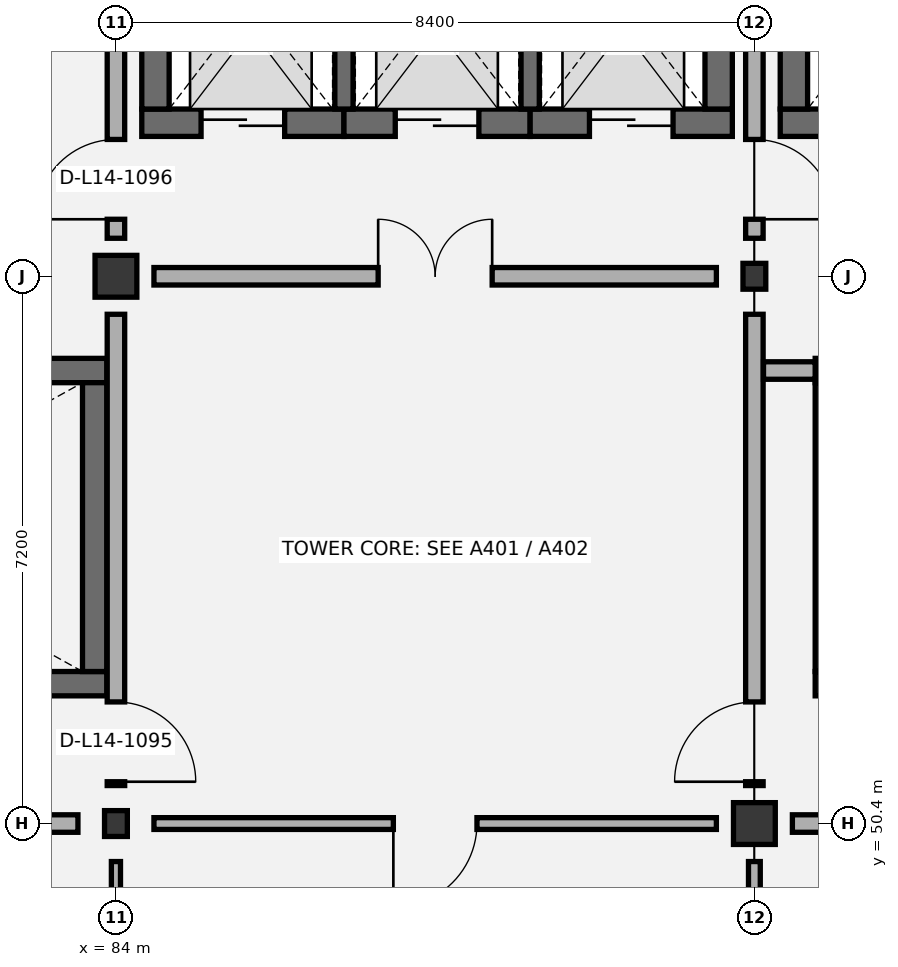
"""IFC4 building model, lengths in metres.
Left out: names, types, materials, properties, quantities, classifications, styles, units other than length and angle.
Written with IfcOpenShell. Run it as: python <this file> out.ifc"""

import sys

from ifc_helpers import new_model, si_unit, direction, frame, frame_2d, origin, origin_2d, place, context, subcontext, project, spatial, rectangle, i_section, extrude, element, fill, save


model = new_model("IFC4")
c1 = context("Model", 3, precision=1e-05, world=origin(), true_north=direction((0.0, 1.0)))
c2 = subcontext(c1, "Body", "Model", "MODEL_VIEW")
j1 = project(units=[si_unit("LENGTHUNIT", "METRE"), si_unit("PLANEANGLEUNIT", "RADIAN")], contexts=[c1])
p1 = place(None, origin())
s1 = spatial("IfcSite", under=j1, at=p1, CompositionType="ELEMENT")
p2 = place(p1, origin())
s2 = spatial("IfcBuilding", under=s1, at=p2, CompositionType="ELEMENT")
p3 = place(p2, frame((0.0, 0.0, 64.8)))
s3 = spatial("IfcBuildingStorey", under=s2, at=p3, CompositionType="ELEMENT", Elevation=64.8)
p4 = place(p3, frame((84.0, 50.4, 0.0), z_axis=(0.0, 0.0, 1.0), x_axis=(1.0, 0.0, 0.0)))
e1 = element("IfcColumn", 1, at=p4, inside=s3, PredefinedType="COLUMN", context=c2, shape_type="SweptSolid", body=[
    extrude(i_section(OverallWidth=0.3, OverallDepth=0.34, WebThickness=0.012, FlangeThickness=0.021, FilletRadius=0.027, at=origin_2d()), origin(), (0.0, 0.0, 1.0), 4.2),
])
for number, where, z_axis, x_axis in (
    (2, (84.0, 57.6, 0.0), (0.0, 0.0, 1.0), (1.0, 0.0, 0.0)),
    (3, (92.4, 50.4, 0.0), (0.0, 0.0, 1.0), (1.0, 0.0, 0.0)),
):
    element("IfcColumn", number, at=place(p3, frame(where, z_axis=z_axis, x_axis=x_axis)), inside=s3, PredefinedType="COLUMN", context=c2, shape_type="SweptSolid", body=[
        extrude(rectangle(XDim=0.55, YDim=0.55, at=origin_2d()), origin(), (0.0, 0.0, 1.0), 4.2),
    ])
p5 = place(p3, frame((92.4, 57.6, 0.0), z_axis=(0.0, 0.0, 1.0), x_axis=(1.0, 0.0, 0.0)))
e4 = element("IfcColumn", 4, at=p5, inside=s3, PredefinedType="COLUMN", context=c2, shape_type="SweptSolid", body=[
    extrude(i_section(OverallWidth=0.3, OverallDepth=0.34, WebThickness=0.012, FlangeThickness=0.021, FilletRadius=0.027, at=origin_2d()), origin(), (0.0, 0.0, 1.0), 4.2),
])
p6 = place(p3, frame((76.4, 52.24, 0.0), z_axis=(0.0, 0.0, 1.0), x_axis=(1.0, 0.0, 0.0)))
e5 = element("IfcWall", 5, at=p6, inside=s3, PredefinedType="SHEAR", context=c2, shape_type="SweptSolid", body=[
    extrude(rectangle(XDim=7.48, YDim=0.32, at=frame_2d((3.74, 0.0))), origin(), (0.0, 0.0, 1.0), 3.9),
])
p7 = place(p6, frame((0.45, 0.0, 0.0)))
e6 = element("IfcOpeningElement", 6, at=p7, cuts=e5, PredefinedType="OPENING", context=c2, shape_type="SweptSolid", body=[
    extrude(rectangle(XDim=1.05, YDim=2.15, at=frame_2d((0.525, 1.075))), frame((0.0, 0.17, 0.0), z_axis=(0.0, -1.0, 0.0), x_axis=(1.0, 0.0, 0.0)), (0.0, 0.0, 1.0), 0.34),
])
p8 = place(p3, frame((76.4, 56.36, 0.0), z_axis=(0.0, 0.0, 1.0), x_axis=(1.0, 0.0, 0.0)))
e7 = element("IfcWall", 7, at=p8, inside=s3, PredefinedType="SHEAR", context=c2, shape_type="SweptSolid", body=[
    extrude(rectangle(XDim=7.48, YDim=0.32, at=frame_2d((3.74, 0.0))), origin(), (0.0, 0.0, 1.0), 3.9),
])
p9 = place(p3, frame((83.72, 52.4, 0.0), z_axis=(0.0, 0.0, 1.0), x_axis=(0.0, 1.0, 0.0)))
e8 = element("IfcWall", 8, at=p9, inside=s3, PredefinedType="SHEAR", context=c2, shape_type="SweptSolid", body=[
    extrude(rectangle(XDim=3.8, YDim=0.32, at=frame_2d((1.9, 0.0))), origin(), (0.0, 0.0, 1.0), 3.9),
])
p10 = place(p3, frame((93.2, 52.24, 0.0), z_axis=(0.0, 0.0, 1.0), x_axis=(1.0, 0.0, 0.0)))
e9 = element("IfcWall", 9, at=p10, inside=s3, PredefinedType="SHEAR", context=c2, shape_type="SweptSolid", body=[
    extrude(rectangle(XDim=7.48, YDim=0.32, at=frame_2d((3.74, 0.0))), origin(), (0.0, 0.0, 1.0), 3.9),
])
p11 = place(p10, frame((0.45, 0.0, 0.0)))
e10 = element("IfcOpeningElement", 10, at=p11, cuts=e9, PredefinedType="OPENING", context=c2, shape_type="SweptSolid", body=[
    extrude(rectangle(XDim=1.05, YDim=2.15, at=frame_2d((0.525, 1.075))), frame((0.0, 0.17, 0.0), z_axis=(0.0, -1.0, 0.0), x_axis=(1.0, 0.0, 0.0)), (0.0, 0.0, 1.0), 0.34),
])
p12 = place(p3, frame((93.2, 56.36, 0.0), z_axis=(0.0, 0.0, 1.0), x_axis=(1.0, 0.0, 0.0)))
e11 = element("IfcWall", 11, at=p12, inside=s3, PredefinedType="SHEAR", context=c2, shape_type="SweptSolid", body=[
    extrude(rectangle(XDim=7.48, YDim=0.32, at=frame_2d((3.74, 0.0))), origin(), (0.0, 0.0, 1.0), 3.9),
])
p13 = place(p3, frame((93.36, 52.4, 0.0), z_axis=(0.0, 0.0, 1.0), x_axis=(0.0, 1.0, 0.0)))
e12 = element("IfcWall", 12, at=p13, inside=s3, PredefinedType="SHEAR", context=c2, shape_type="SweptSolid", body=[
    extrude(rectangle(XDim=3.8, YDim=0.32, at=frame_2d((1.9, 0.0))), origin(), (0.0, 0.0, 1.0), 3.9),
])
p14 = place(p3, frame((84.34, 59.62, 0.0), z_axis=(0.0, 0.0, 1.0), x_axis=(1.0, 0.0, 0.0)))
e13 = element("IfcWall", 13, at=p14, inside=s3, PredefinedType="SHEAR", context=c2, shape_type="SweptSolid", body=[
    extrude(rectangle(XDim=2.66, YDim=0.36, at=frame_2d((1.33, 0.0))), origin(), (0.0, 0.0, 1.0), 3.9),
])
p15 = place(p14, frame((0.78, 0.0, 0.0)))
e14 = element("IfcOpeningElement", 14, at=p15, cuts=e13, PredefinedType="OPENING", context=c2, shape_type="SweptSolid", body=[
    extrude(rectangle(XDim=1.1, YDim=2.15, at=frame_2d((0.55, 1.075))), frame((0.0, 0.19, 0.0), z_axis=(0.0, -1.0, 0.0), x_axis=(1.0, 0.0, 0.0)), (0.0, 0.0, 1.0), 0.38),
])
p16 = place(p3, frame((87.0, 59.62, 0.0), z_axis=(0.0, 0.0, 1.0), x_axis=(1.0, 0.0, 0.0)))
e15 = element("IfcWall", 15, at=p16, inside=s3, PredefinedType="SHEAR", context=c2, shape_type="SweptSolid", body=[
    extrude(rectangle(XDim=2.45, YDim=0.36, at=frame_2d((1.225, 0.0))), origin(), (0.0, 0.0, 1.0), 3.9),
])
p17 = place(p16, frame((0.675, 0.0, 0.0)))
e16 = element("IfcOpeningElement", 16, at=p17, cuts=e15, PredefinedType="OPENING", context=c2, shape_type="SweptSolid", body=[
    extrude(rectangle(XDim=1.1, YDim=2.15, at=frame_2d((0.55, 1.075))), frame((0.0, 0.19, 0.0), z_axis=(0.0, -1.0, 0.0), x_axis=(1.0, 0.0, 0.0)), (0.0, 0.0, 1.0), 0.38),
])
p18 = place(p3, frame((89.45, 59.62, 0.0), z_axis=(0.0, 0.0, 1.0), x_axis=(1.0, 0.0, 0.0)))
e17 = element("IfcWall", 17, at=p18, inside=s3, PredefinedType="SHEAR", context=c2, shape_type="SweptSolid", body=[
    extrude(rectangle(XDim=2.66, YDim=0.36, at=frame_2d((1.33, 0.0))), origin(), (0.0, 0.0, 1.0), 3.9),
])
p19 = place(p18, frame((0.78, 0.0, 0.0)))
e18 = element("IfcOpeningElement", 18, at=p19, cuts=e17, PredefinedType="OPENING", context=c2, shape_type="SweptSolid", body=[
    extrude(rectangle(XDim=1.1, YDim=2.15, at=frame_2d((0.55, 1.075))), frame((0.0, 0.19, 0.0), z_axis=(0.0, -1.0, 0.0), x_axis=(1.0, 0.0, 0.0)), (0.0, 0.0, 1.0), 0.38),
])
for number, where, z_axis, x_axis in (
    (19, (84.52, 59.8, 0.0), (0.0, 0.0, 1.0), (0.0, 1.0, 0.0)),
    (20, (91.93, 59.8, 0.0), (0.0, 0.0, 1.0), (0.0, 1.0, 0.0)),
):
    element("IfcWall", number, at=place(p3, frame(where, z_axis=z_axis, x_axis=x_axis)), inside=s3, PredefinedType="SHEAR", context=c2, shape_type="SweptSolid", body=[
        extrude(rectangle(XDim=2.8, YDim=0.36, at=frame_2d((1.4, 0.0))), origin(), (0.0, 0.0, 1.0), 3.9),
    ])
for number, where, z_axis, x_axis in (
    (21, (87.0, 59.8, 0.0), (0.0, 0.0, 1.0), (0.0, 1.0, 0.0)),
    (22, (89.45, 59.8, 0.0), (0.0, 0.0, 1.0), (0.0, 1.0, 0.0)),
):
    element("IfcWall", number, at=place(p3, frame(where, z_axis=z_axis, x_axis=x_axis)), inside=s3, PredefinedType="SHEAR", context=c2, shape_type="SweptSolid", body=[
        extrude(rectangle(XDim=2.8, YDim=0.24, at=frame_2d((1.4, 0.0))), origin(), (0.0, 0.0, 1.0), 3.9),
    ])
p20 = place(p3, frame((92.74, 59.62, 0.0), z_axis=(0.0, 0.0, 1.0), x_axis=(1.0, 0.0, 0.0)))
e23 = element("IfcWall", 23, at=p20, inside=s3, PredefinedType="SHEAR", context=c2, shape_type="SweptSolid", body=[
    extrude(rectangle(XDim=2.87, YDim=0.36, at=frame_2d((1.435, 0.0))), origin(), (0.0, 0.0, 1.0), 3.9),
])
p21 = place(p20, frame((0.76, 0.0, 0.0)))
e24 = element("IfcOpeningElement", 24, at=p21, cuts=e23, PredefinedType="OPENING", context=c2, shape_type="SweptSolid", body=[
    extrude(rectangle(XDim=1.35, YDim=2.2, at=frame_2d((0.675, 1.1))), frame((0.0, 0.19, 0.0), z_axis=(0.0, -1.0, 0.0), x_axis=(1.0, 0.0, 0.0)), (0.0, 0.0, 1.0), 0.38),
])
p22 = place(p3, frame((92.92, 59.8, 0.0), z_axis=(0.0, 0.0, 1.0), x_axis=(0.0, 1.0, 0.0)))
e25 = element("IfcWall", 25, at=p22, inside=s3, PredefinedType="SHEAR", context=c2, shape_type="SweptSolid", body=[
    extrude(rectangle(XDim=2.8, YDim=0.36, at=frame_2d((1.4, 0.0))), origin(), (0.0, 0.0, 1.0), 3.9),
])
p23 = place(p3, frame((84.0, 43.7, 0.0), z_axis=(0.0, 0.0, 1.0), x_axis=(0.0, 1.0, 0.0)))
e26 = element("IfcWall", 26, at=p23, inside=s3, PredefinedType="PARTITIONING", context=c2, shape_type="SweptSolid", body=[
    extrude(rectangle(XDim=6.2, YDim=0.12, at=frame_2d((3.1, 0.0))), origin(), (0.0, 0.0, 1.0), 3.495),
])
p24 = place(p3, frame((76.1, 50.4, 0.0), z_axis=(0.0, 0.0, 1.0), x_axis=(1.0, 0.0, 0.0)))
e27 = element("IfcWall", 27, at=p24, inside=s3, PredefinedType="PARTITIONING", context=c2, shape_type="SweptSolid", body=[
    extrude(rectangle(XDim=7.4, YDim=0.23, at=frame_2d((3.7, 0.0))), origin(), (0.0, 0.0, 1.0), 3.395),
])
p25 = place(p24, frame((2.95, 0.0, 0.0)))
e28 = element("IfcOpeningElement", 28, at=p25, cuts=e27, PredefinedType="OPENING", context=c2, shape_type="SweptSolid", body=[
    extrude(rectangle(XDim=1.5, YDim=2.15, at=frame_2d((0.75, 1.075))), frame((0.0, 0.125, 0.0), z_axis=(0.0, -1.0, 0.0), x_axis=(1.0, 0.0, 0.0)), (0.0, 0.0, 1.0), 0.25),
])
p26 = place(p3, frame((84.0, 50.9, 0.0), z_axis=(0.0, 0.0, 1.0), x_axis=(0.0, 1.0, 0.0)))
e29 = element("IfcWall", 29, at=p26, inside=s3, PredefinedType="PARTITIONING", context=c2, shape_type="SweptSolid", body=[
    extrude(rectangle(XDim=6.2, YDim=0.23, at=frame_2d((3.1, 0.0))), origin(), (0.0, 0.0, 1.0), 3.395),
])
p27 = place(p26, frame((0.05, 0.0, 0.0)))
e30 = element("IfcOpeningElement", 30, at=p27, cuts=e29, PredefinedType="OPENING", context=c2, shape_type="SweptSolid", body=[
    extrude(rectangle(XDim=1.05, YDim=2.15, at=frame_2d((0.525, 1.075))), frame((0.0, 0.125, 0.0), z_axis=(0.0, -1.0, 0.0), x_axis=(1.0, 0.0, 0.0)), (0.0, 0.0, 1.0), 0.25),
])
p28 = place(p3, frame((84.0, 58.1, 0.0), z_axis=(0.0, 0.0, 1.0), x_axis=(0.0, 1.0, 0.0)))
e31 = element("IfcWall", 31, at=p28, inside=s3, PredefinedType="PARTITIONING", context=c2, shape_type="SweptSolid", body=[
    extrude(rectangle(XDim=6.2, YDim=0.23, at=frame_2d((3.1, 0.0))), origin(), (0.0, 0.0, 1.0), 3.605),
])
p29 = place(p28, frame((0.25, 0.0, 0.0)))
e32 = element("IfcOpeningElement", 32, at=p29, cuts=e31, PredefinedType="OPENING", context=c2, shape_type="SweptSolid", body=[
    extrude(rectangle(XDim=1.05, YDim=2.15, at=frame_2d((0.525, 1.075))), frame((0.0, 0.125, 0.0), z_axis=(0.0, -1.0, 0.0), x_axis=(1.0, 0.0, 0.0)), (0.0, 0.0, 1.0), 0.25),
])
p30 = place(p3, frame((92.4, 43.7, 0.0), z_axis=(0.0, 0.0, 1.0), x_axis=(0.0, 1.0, 0.0)))
e33 = element("IfcWall", 33, at=p30, inside=s3, PredefinedType="PARTITIONING", context=c2, shape_type="SweptSolid", body=[
    extrude(rectangle(XDim=6.2, YDim=0.155, at=frame_2d((3.1, 0.0))), origin(), (0.0, 0.0, 1.0), 3.395),
])
p31 = place(p30, frame((2.525, 0.0, 0.0)))
e34 = element("IfcOpeningElement", 34, at=p31, cuts=e33, PredefinedType="OPENING", context=c2, shape_type="SweptSolid", body=[
    extrude(rectangle(XDim=1.15, YDim=2.1, at=frame_2d((0.575, 1.05))), frame((0.0, 0.087, 0.0), z_axis=(0.0, -1.0, 0.0), x_axis=(1.0, 0.0, 0.0)), (0.0, 0.0, 1.0), 0.175),
])
p32 = place(p3, frame((84.5, 50.4, 0.0), z_axis=(0.0, 0.0, 1.0), x_axis=(1.0, 0.0, 0.0)))
e35 = element("IfcWall", 35, at=p32, inside=s3, PredefinedType="PARTITIONING", context=c2, shape_type="SweptSolid", body=[
    extrude(rectangle(XDim=7.4, YDim=0.155, at=frame_2d((3.7, 0.0))), origin(), (0.0, 0.0, 1.0), 3.395),
])
p33 = place(p32, frame((3.15, 0.0, 0.0)))
e36 = element("IfcOpeningElement", 36, at=p33, cuts=e35, PredefinedType="OPENING", context=c2, shape_type="SweptSolid", body=[
    extrude(rectangle(XDim=1.1, YDim=2.1, at=frame_2d((0.55, 1.05))), frame((0.0, 0.087, 0.0), z_axis=(0.0, -1.0, 0.0), x_axis=(1.0, 0.0, 0.0)), (0.0, 0.0, 1.0), 0.175),
])
p34 = place(p3, frame((92.4, 50.9, 0.0), z_axis=(0.0, 0.0, 1.0), x_axis=(0.0, 1.0, 0.0)))
e37 = element("IfcWall", 37, at=p34, inside=s3, PredefinedType="PARTITIONING", context=c2, shape_type="SweptSolid", body=[
    extrude(rectangle(XDim=6.2, YDim=0.23, at=frame_2d((3.1, 0.0))), origin(), (0.0, 0.0, 1.0), 3.605),
])
p35 = place(p34, frame((0.05, 0.0, 0.0)))
e38 = element("IfcOpeningElement", 38, at=p35, cuts=e37, PredefinedType="OPENING", context=c2, shape_type="SweptSolid", body=[
    extrude(rectangle(XDim=1.05, YDim=2.15, at=frame_2d((0.525, 1.075))), frame((0.0, 0.125, 0.0), z_axis=(0.0, -1.0, 0.0), x_axis=(1.0, 0.0, 0.0)), (0.0, 0.0, 1.0), 0.25),
])
p36 = place(p3, frame((84.5, 57.6, 0.0), z_axis=(0.0, 0.0, 1.0), x_axis=(1.0, 0.0, 0.0)))
e39 = element("IfcWall", 39, at=p36, inside=s3, PredefinedType="PARTITIONING", context=c2, shape_type="SweptSolid", body=[
    extrude(rectangle(XDim=7.4, YDim=0.23, at=frame_2d((3.7, 0.0))), origin(), (0.0, 0.0, 1.0), 3.395),
])
p37 = place(p36, frame((2.95, 0.0, 0.0)))
e40 = element("IfcOpeningElement", 40, at=p37, cuts=e39, PredefinedType="OPENING", context=c2, shape_type="SweptSolid", body=[
    extrude(rectangle(XDim=1.5, YDim=2.15, at=frame_2d((0.75, 1.075))), frame((0.0, 0.125, 0.0), z_axis=(0.0, -1.0, 0.0), x_axis=(1.0, 0.0, 0.0)), (0.0, 0.0, 1.0), 0.25),
])
p38 = place(p3, frame((92.4, 58.1, 0.0), z_axis=(0.0, 0.0, 1.0), x_axis=(0.0, 1.0, 0.0)))
e41 = element("IfcWall", 41, at=p38, inside=s3, PredefinedType="PARTITIONING", context=c2, shape_type="SweptSolid", body=[
    extrude(rectangle(XDim=6.2, YDim=0.23, at=frame_2d((3.1, 0.0))), origin(), (0.0, 0.0, 1.0), 3.395),
])
p39 = place(p38, frame((0.25, 0.0, 0.0)))
e42 = element("IfcOpeningElement", 42, at=p39, cuts=e41, PredefinedType="OPENING", context=c2, shape_type="SweptSolid", body=[
    extrude(rectangle(XDim=1.05, YDim=2.15, at=frame_2d((0.525, 1.075))), frame((0.0, 0.125, 0.0), z_axis=(0.0, -1.0, 0.0), x_axis=(1.0, 0.0, 0.0)), (0.0, 0.0, 1.0), 0.25),
])
p40 = place(p3, frame((92.9, 50.4, 0.0), z_axis=(0.0, 0.0, 1.0), x_axis=(1.0, 0.0, 0.0)))
e43 = element("IfcWall", 43, at=p40, inside=s3, PredefinedType="PARTITIONING", context=c2, shape_type="SweptSolid", body=[
    extrude(rectangle(XDim=7.4, YDim=0.23, at=frame_2d((3.7, 0.0))), origin(), (0.0, 0.0, 1.0), 3.395),
])
p41 = place(p40, frame((2.95, 0.0, 0.0)))
e44 = element("IfcOpeningElement", 44, at=p41, cuts=e43, PredefinedType="OPENING", context=c2, shape_type="SweptSolid", body=[
    extrude(rectangle(XDim=1.5, YDim=2.15, at=frame_2d((0.75, 1.075))), frame((0.0, 0.125, 0.0), z_axis=(0.0, -1.0, 0.0), x_axis=(1.0, 0.0, 0.0)), (0.0, 0.0, 1.0), 0.25),
])
p42 = place(p3, frame((92.52, 56.36, 0.0), z_axis=(0.0, 0.0, 1.0), x_axis=(1.0, 0.0, 0.0)))
e45 = element("IfcWall", 45, at=p42, inside=s3, PredefinedType="PARTITIONING", context=c2, shape_type="SweptSolid", body=[
    extrude(rectangle(XDim=0.68, YDim=0.23, at=frame_2d((0.34, 0.0))), origin(), (0.0, 0.0, 1.0), 3.9),
])
p43 = place(p15, origin())
e46 = element("IfcDoor", 46, at=p43, inside=s3, OperationType="DOUBLE_DOOR_SLIDING", PredefinedType="DOOR", context=c2, shape_type="SweptSolid", body=[
    extrude(rectangle(XDim=1.1, YDim=2.15, at=frame_2d((0.55, 1.075))), frame((0.0, 0.025, 0.0), z_axis=(0.0, -1.0, 0.0), x_axis=(1.0, 0.0, 0.0)), (0.0, 0.0, 1.0), 0.05),
])
fill(e14, e46)
p44 = place(p17, origin())
e47 = element("IfcDoor", 47, at=p44, inside=s3, OperationType="DOUBLE_DOOR_SLIDING", PredefinedType="DOOR", context=c2, shape_type="SweptSolid", body=[
    extrude(rectangle(XDim=1.1, YDim=2.15, at=frame_2d((0.55, 1.075))), frame((0.0, 0.025, 0.0), z_axis=(0.0, -1.0, 0.0), x_axis=(1.0, 0.0, 0.0)), (0.0, 0.0, 1.0), 0.05),
])
fill(e16, e47)
p45 = place(p19, origin())
e48 = element("IfcDoor", 48, at=p45, inside=s3, OperationType="DOUBLE_DOOR_SLIDING", PredefinedType="DOOR", context=c2, shape_type="SweptSolid", body=[
    extrude(rectangle(XDim=1.1, YDim=2.15, at=frame_2d((0.55, 1.075))), frame((0.0, 0.025, 0.0), z_axis=(0.0, -1.0, 0.0), x_axis=(1.0, 0.0, 0.0)), (0.0, 0.0, 1.0), 0.05),
])
fill(e18, e48)
p46 = place(p27, frame((1.05, 0.0, 0.0), z_axis=(0.0, 0.0, 1.0), x_axis=(-1.0, 0.0, 0.0)))
e49 = element("IfcDoor", 49, at=p46, inside=s3, OperationType="SINGLE_SWING_RIGHT", PredefinedType="DOOR", context=c2, shape_type="SweptSolid", body=[
    extrude(rectangle(XDim=1.05, YDim=2.15, at=frame_2d((0.525, 1.075))), frame((0.0, 0.025, 0.0), z_axis=(0.0, -1.0, 0.0), x_axis=(1.0, 0.0, 0.0)), (0.0, 0.0, 1.0), 0.05),
])
fill(e30, e49)
p47 = place(p29, origin())
e50 = element("IfcDoor", 50, at=p47, inside=s3, OperationType="SINGLE_SWING_LEFT", PredefinedType="DOOR", context=c2, shape_type="SweptSolid", body=[
    extrude(rectangle(XDim=1.05, YDim=2.15, at=frame_2d((0.525, 1.075))), frame((0.0, 0.025, 0.0), z_axis=(0.0, -1.0, 0.0), x_axis=(1.0, 0.0, 0.0)), (0.0, 0.0, 1.0), 0.05),
])
fill(e32, e50)
p48 = place(p33, frame((1.1, 0.0, 0.0), z_axis=(0.0, 0.0, 1.0), x_axis=(-1.0, 0.0, 0.0)))
e51 = element("IfcDoor", 51, at=p48, inside=s3, OperationType="SINGLE_SWING_RIGHT", PredefinedType="DOOR", context=c2, shape_type="SweptSolid", body=[
    extrude(rectangle(XDim=1.1, YDim=2.1, at=frame_2d((0.55, 1.05))), frame((0.0, 0.025, 0.0), z_axis=(0.0, -1.0, 0.0), x_axis=(1.0, 0.0, 0.0)), (0.0, 0.0, 1.0), 0.05),
])
fill(e36, e51)
p49 = place(p35, origin())
e52 = element("IfcDoor", 52, at=p49, inside=s3, OperationType="SINGLE_SWING_LEFT", PredefinedType="DOOR", context=c2, shape_type="SweptSolid", body=[
    extrude(rectangle(XDim=1.05, YDim=2.15, at=frame_2d((0.525, 1.075))), frame((0.0, 0.025, 0.0), z_axis=(0.0, -1.0, 0.0), x_axis=(1.0, 0.0, 0.0)), (0.0, 0.0, 1.0), 0.05),
])
fill(e38, e52)
p50 = place(p37, origin())
e53 = element("IfcDoor", 53, at=p50, inside=s3, OperationType="DOUBLE_DOOR_SINGLE_SWING", PredefinedType="DOOR", context=c2, shape_type="SweptSolid", body=[
    extrude(rectangle(XDim=1.5, YDim=2.15, at=frame_2d((0.75, 1.075))), frame((0.0, 0.025, 0.0), z_axis=(0.0, -1.0, 0.0), x_axis=(1.0, 0.0, 0.0)), (0.0, 0.0, 1.0), 0.05),
])
fill(e40, e53)
p51 = place(p39, frame((1.05, 0.0, 0.0), z_axis=(0.0, 0.0, 1.0), x_axis=(-1.0, 0.0, 0.0)))
e54 = element("IfcDoor", 54, at=p51, inside=s3, OperationType="SINGLE_SWING_RIGHT", PredefinedType="DOOR", context=c2, shape_type="SweptSolid", body=[
    extrude(rectangle(XDim=1.05, YDim=2.15, at=frame_2d((0.525, 1.075))), frame((0.0, 0.025, 0.0), z_axis=(0.0, -1.0, 0.0), x_axis=(1.0, 0.0, 0.0)), (0.0, 0.0, 1.0), 0.05),
])
fill(e42, e54)
save(model, sys.argv[1])
